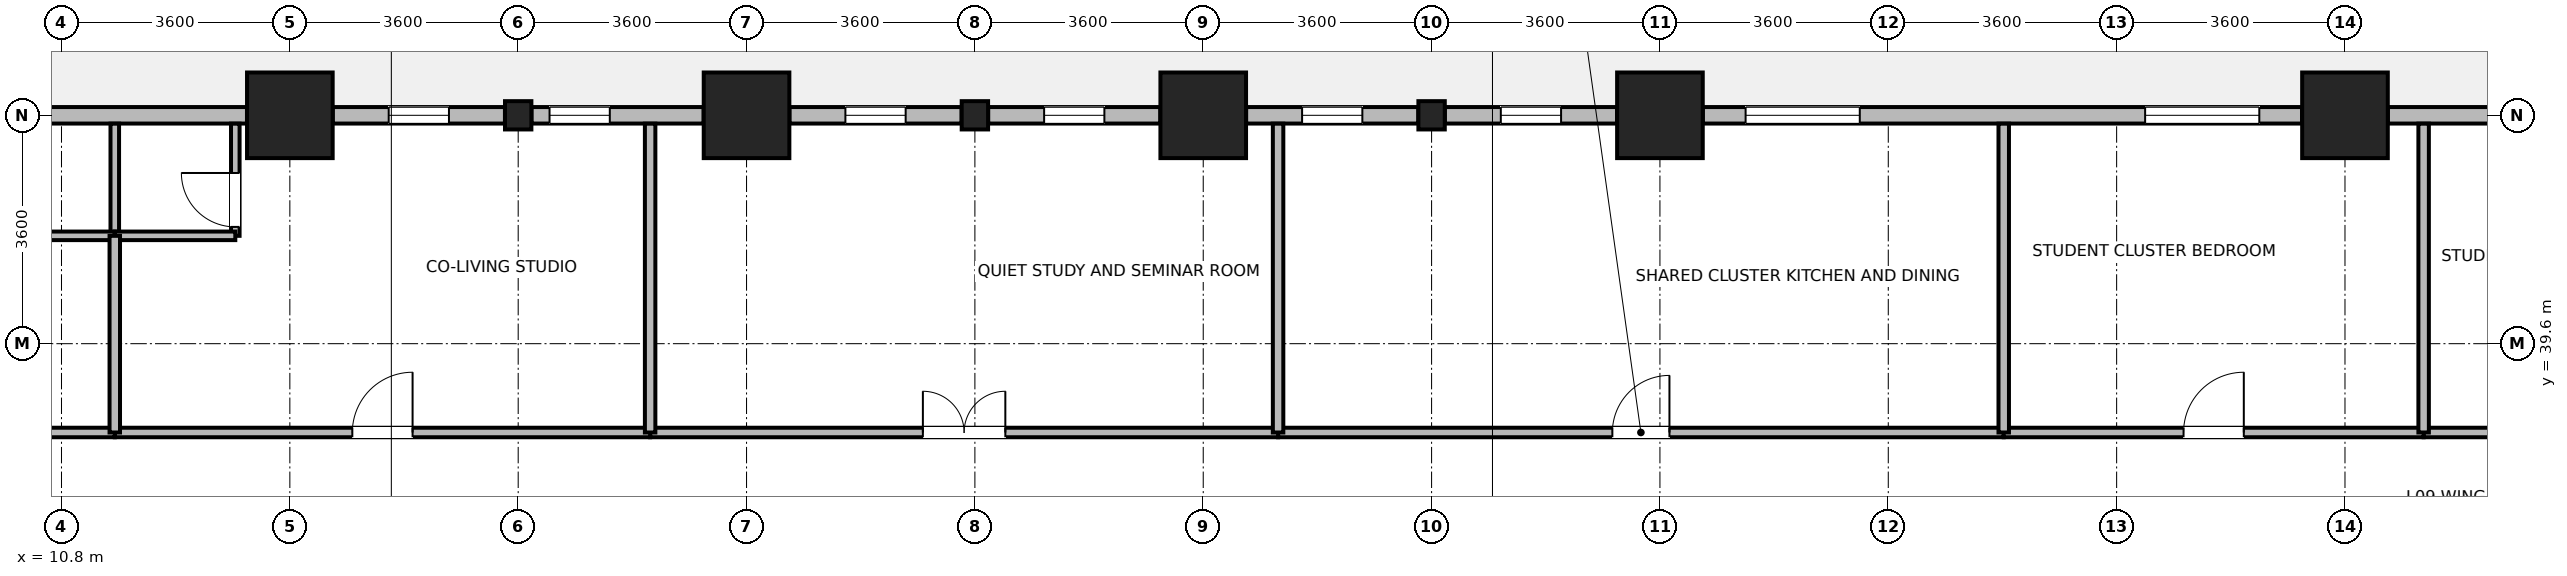
"""IFC4 building model, lengths in metres.
Left out: names, types, materials, properties, quantities, classifications, styles, units other than length and angle.
Written with IfcOpenShell. Run it as: python <this file> out.ifc"""

import sys

from ifc_helpers import new_model, si_unit, direction, frame, frame_2d, origin, origin_2d, place, context, subcontext, project, spatial, rectangle, i_section, extrude, source, transform, mapped, element, fill, save


model = new_model("IFC4")
c1 = context("Model", 3, precision=1e-05, world=origin(), true_north=direction((0.0, 1.0)))
c2 = subcontext(c1, "Body", "Model", "MODEL_VIEW")
j1 = project(units=[si_unit("LENGTHUNIT", "METRE"), si_unit("PLANEANGLEUNIT", "RADIAN")], contexts=[c1])
p1 = place(None, origin())
s1 = spatial("IfcSite", under=j1, at=p1, CompositionType="ELEMENT")
p2 = place(p1, origin())
s2 = spatial("IfcBuilding", under=s1, at=p2, CompositionType="ELEMENT")
p3 = place(p2, frame((0.0, 0.0, 40.1)))
s3 = spatial("IfcBuildingStorey", under=s2, at=p3, CompositionType="ELEMENT", Elevation=40.1)
m1 = source(origin(), c2, "Body", "SweptSolid", [
    extrude(rectangle(XDim=1.35, YDim=1.35, at=origin_2d()), origin(), (0.0, 0.0, 1.0), 3.7),
])
for number, where, z_axis, x_axis in (
    (1, (14.4, 43.2, 0.0), (0.0, 0.0, 1.0), (1.0, 0.0, 0.0)),
    (2, (21.6, 43.2, 0.0), (0.0, 0.0, 1.0), (1.0, 0.0, 0.0)),
    (3, (28.8, 43.2, 0.0), (0.0, 0.0, 1.0), (1.0, 0.0, 0.0)),
    (4, (36.0, 43.2, 0.0), (0.0, 0.0, 1.0), (1.0, 0.0, 0.0)),
    (5, (46.8, 43.2, 0.0), (0.0, 0.0, 1.0), (1.0, 0.0, 0.0)),
):
    element("IfcColumn", number, at=place(p3, frame(where, z_axis=z_axis, x_axis=x_axis)), inside=s3, PredefinedType="COLUMN", context=c2, shape_type="MappedRepresentation", body=[
        mapped(m1, transform((0.0, 0.0, 0.0), x_axis=(1.0, 0.0, 0.0), y_axis=(0.0, 1.0, 0.0), z_axis=(0.0, 0.0, 1.0), scale=1.0)),
    ])
m2 = source(origin(), c2, "Body", "SweptSolid", [
    extrude(i_section(OverallWidth=0.416, OverallDepth=0.446, WebThickness=0.029, FlangeThickness=0.04, FilletRadius=0.015, at=origin_2d()), origin(), (0.0, 0.0, 1.0), 3.7),
])
for number, where, z_axis, x_axis in (
    (6, (18.0, 43.2, 0.0), (0.0, 0.0, 1.0), (1.0, 0.0, 0.0)),
    (7, (25.2, 43.2, 0.0), (0.0, 0.0, 1.0), (1.0, 0.0, 0.0)),
    (8, (32.4, 43.2, 0.0), (0.0, 0.0, 1.0), (1.0, 0.0, 0.0)),
):
    element("IfcColumn", number, at=place(p3, frame(where, z_axis=z_axis, x_axis=x_axis)), inside=s3, PredefinedType="COLUMN", context=c2, shape_type="MappedRepresentation", body=[
        mapped(m2, transform((0.0, 0.0, 0.0), x_axis=(1.0, 0.0, 0.0), y_axis=(0.0, 1.0, 0.0), z_axis=(0.0, 0.0, 1.0), scale=1.0)),
    ])
p4 = place(p3, frame((47.476, 43.2, 0.0), z_axis=(0.0, 0.0, 1.0), x_axis=(1.0, 0.0, 0.0)))
e9 = element("IfcWall", 9, at=p4, inside=s3, PredefinedType="STANDARD", context=c2, shape_type="SweptSolid", body=[
    extrude(rectangle(XDim=9.989, YDim=0.26, at=frame_2d((4.995, 0.0))), origin(), (0.0, 0.0, 1.0), 3.43),
])
p5 = place(p4, frame((4.245, 0.0, 0.0)))
e10 = element("IfcOpeningElement", 10, at=p5, cuts=e9, PredefinedType="OPENING", context=c2, shape_type="SweptSolid", body=[
    extrude(rectangle(XDim=1.5, YDim=2.15, at=frame_2d((0.75, 1.075))), frame((0.0, 0.14, 0.0), z_axis=(0.0, -1.0, 0.0), x_axis=(1.0, 0.0, 0.0)), (0.0, 0.0, 1.0), 0.28),
])
p6 = place(p3, frame((36.676, 43.2, 0.0), z_axis=(0.0, 0.0, 1.0), x_axis=(1.0, 0.0, 0.0)))
e11 = element("IfcWall", 11, at=p6, inside=s3, PredefinedType="STANDARD", context=c2, shape_type="SweptSolid", body=[
    extrude(rectangle(XDim=9.448, YDim=0.26, at=frame_2d((4.724, 0.0))), origin(), (0.0, 0.0, 1.0), 2.93),
])
p7 = place(p6, frame((0.675, 0.0, 0.85)))
e12 = element("IfcOpeningElement", 12, at=p7, cuts=e11, PredefinedType="OPENING", context=c2, shape_type="SweptSolid", body=[
    extrude(rectangle(XDim=1.8, YDim=1.85, at=frame_2d((0.9, 0.925))), frame((0.0, 0.14, 0.0), z_axis=(0.0, -1.0, 0.0), x_axis=(1.0, 0.0, 0.0)), (0.0, 0.0, 1.0), 0.28),
])
p8 = place(p6, frame((6.973, 0.0, 0.85)))
e13 = element("IfcOpeningElement", 13, at=p8, cuts=e11, PredefinedType="OPENING", context=c2, shape_type="SweptSolid", body=[
    extrude(rectangle(XDim=1.8, YDim=1.85, at=frame_2d((0.9, 0.925))), frame((0.0, 0.14, 0.0), z_axis=(0.0, -1.0, 0.0), x_axis=(1.0, 0.0, 0.0)), (0.0, 0.0, 1.0), 0.28),
])
p9 = place(p3, frame((32.609, 43.2, 0.0), z_axis=(0.0, 0.0, 1.0), x_axis=(1.0, 0.0, 0.0)))
e14 = element("IfcWall", 14, at=p9, inside=s3, PredefinedType="STANDARD", context=c2, shape_type="SweptSolid", body=[
    extrude(rectangle(XDim=2.715, YDim=0.26, at=frame_2d((1.357, 0.0))), origin(), (0.0, 0.0, 1.0), 2.93),
])
p10 = place(p9, frame((0.883, 0.0, 0.85)))
e15 = element("IfcOpeningElement", 15, at=p10, cuts=e14, PredefinedType="OPENING", context=c2, shape_type="SweptSolid", body=[
    extrude(rectangle(XDim=0.95, YDim=1.75, at=frame_2d((0.475, 0.875))), frame((0.0, 0.14, 0.0), z_axis=(0.0, -1.0, 0.0), x_axis=(1.0, 0.0, 0.0)), (0.0, 0.0, 1.0), 0.28),
])
p11 = place(p3, frame((29.476, 43.2, 0.0), z_axis=(0.0, 0.0, 1.0), x_axis=(1.0, 0.0, 0.0)))
e16 = element("IfcWall", 16, at=p11, inside=s3, PredefinedType="STANDARD", context=c2, shape_type="SweptSolid", body=[
    extrude(rectangle(XDim=2.715, YDim=0.26, at=frame_2d((1.357, 0.0))), origin(), (0.0, 0.0, 1.0), 2.93),
])
p12 = place(p11, frame((0.883, 0.0, 0.85)))
e17 = element("IfcOpeningElement", 17, at=p12, cuts=e16, PredefinedType="OPENING", context=c2, shape_type="SweptSolid", body=[
    extrude(rectangle(XDim=0.95, YDim=1.75, at=frame_2d((0.475, 0.875))), frame((0.0, 0.14, 0.0), z_axis=(0.0, -1.0, 0.0), x_axis=(1.0, 0.0, 0.0)), (0.0, 0.0, 1.0), 0.28),
])
p13 = place(p3, frame((25.409, 43.2, 0.0), z_axis=(0.0, 0.0, 1.0), x_axis=(1.0, 0.0, 0.0)))
e18 = element("IfcWall", 18, at=p13, inside=s3, PredefinedType="STANDARD", context=c2, shape_type="SweptSolid", body=[
    extrude(rectangle(XDim=2.715, YDim=0.26, at=frame_2d((1.357, 0.0))), origin(), (0.0, 0.0, 1.0), 2.93),
])
p14 = place(p13, frame((0.883, 0.0, 0.85)))
e19 = element("IfcOpeningElement", 19, at=p14, cuts=e18, PredefinedType="OPENING", context=c2, shape_type="SweptSolid", body=[
    extrude(rectangle(XDim=0.95, YDim=1.75, at=frame_2d((0.475, 0.875))), frame((0.0, 0.14, 0.0), z_axis=(0.0, -1.0, 0.0), x_axis=(1.0, 0.0, 0.0)), (0.0, 0.0, 1.0), 0.28),
])
p15 = place(p3, frame((22.276, 43.2, 0.0), z_axis=(0.0, 0.0, 1.0), x_axis=(1.0, 0.0, 0.0)))
e20 = element("IfcWall", 20, at=p15, inside=s3, PredefinedType="STANDARD", context=c2, shape_type="SweptSolid", body=[
    extrude(rectangle(XDim=2.715, YDim=0.26, at=frame_2d((1.357, 0.0))), origin(), (0.0, 0.0, 1.0), 2.93),
])
p16 = place(p15, frame((0.883, 0.0, 0.85)))
e21 = element("IfcOpeningElement", 21, at=p16, cuts=e20, PredefinedType="OPENING", context=c2, shape_type="SweptSolid", body=[
    extrude(rectangle(XDim=0.95, YDim=1.75, at=frame_2d((0.475, 0.875))), frame((0.0, 0.14, 0.0), z_axis=(0.0, -1.0, 0.0), x_axis=(1.0, 0.0, 0.0)), (0.0, 0.0, 1.0), 0.28),
])
p17 = place(p3, frame((18.209, 43.2, 0.0), z_axis=(0.0, 0.0, 1.0), x_axis=(1.0, 0.0, 0.0)))
e22 = element("IfcWall", 22, at=p17, inside=s3, PredefinedType="STANDARD", context=c2, shape_type="SweptSolid", body=[
    extrude(rectangle(XDim=2.715, YDim=0.26, at=frame_2d((1.357, 0.0))), origin(), (0.0, 0.0, 1.0), 2.93),
])
p18 = place(p17, frame((0.285, 0.0, 0.85)))
e23 = element("IfcOpeningElement", 23, at=p18, cuts=e22, PredefinedType="OPENING", context=c2, shape_type="SweptSolid", body=[
    extrude(rectangle(XDim=0.95, YDim=1.75, at=frame_2d((0.475, 0.875))), frame((0.0, 0.14, 0.0), z_axis=(0.0, -1.0, 0.0), x_axis=(1.0, 0.0, 0.0)), (0.0, 0.0, 1.0), 0.28),
])
p19 = place(p3, frame((15.076, 43.2, 0.0), z_axis=(0.0, 0.0, 1.0), x_axis=(1.0, 0.0, 0.0)))
e24 = element("IfcWall", 24, at=p19, inside=s3, PredefinedType="STANDARD", context=c2, shape_type="SweptSolid", body=[
    extrude(rectangle(XDim=2.715, YDim=0.26, at=frame_2d((1.357, 0.0))), origin(), (0.0, 0.0, 1.0), 2.93),
])
p20 = place(p19, frame((0.883, 0.0, 0.85)))
e25 = element("IfcOpeningElement", 25, at=p20, cuts=e24, PredefinedType="OPENING", context=c2, shape_type="SweptSolid", body=[
    extrude(rectangle(XDim=0.95, YDim=1.75, at=frame_2d((0.475, 0.875))), frame((0.0, 0.14, 0.0), z_axis=(0.0, -1.0, 0.0), x_axis=(1.0, 0.0, 0.0)), (0.0, 0.0, 1.0), 0.28),
])
p21 = place(p3, frame((3.735, 43.2, 0.0), z_axis=(0.0, 0.0, 1.0), x_axis=(1.0, 0.0, 0.0)))
e26 = element("IfcWall", 26, at=p21, inside=s3, PredefinedType="STANDARD", context=c2, shape_type="SweptSolid", body=[
    extrude(rectangle(XDim=9.989, YDim=0.26, at=frame_2d((4.995, 0.0))), origin(), (0.0, 0.0, 1.0), 3.43),
])
p22 = place(p21, frame((0.765, 0.0, 0.85)))
e27 = element("IfcOpeningElement", 27, at=p22, cuts=e26, PredefinedType="OPENING", context=c2, shape_type="SweptSolid", body=[
    extrude(rectangle(XDim=1.8, YDim=1.85, at=frame_2d((0.9, 0.925))), frame((0.0, 0.14, 0.0), z_axis=(0.0, -1.0, 0.0), x_axis=(1.0, 0.0, 0.0)), (0.0, 0.0, 1.0), 0.28),
])
p23 = place(p21, frame((4.52, 0.0, 0.85)))
e28 = element("IfcOpeningElement", 28, at=p23, cuts=e26, PredefinedType="OPENING", context=c2, shape_type="SweptSolid", body=[
    extrude(rectangle(XDim=0.95, YDim=1.75, at=frame_2d((0.475, 0.875))), frame((0.0, 0.14, 0.0), z_axis=(0.0, -1.0, 0.0), x_axis=(1.0, 0.0, 0.0)), (0.0, 0.0, 1.0), 0.28),
])
p24 = place(p3, frame((11.64, 41.3, 0.0), z_axis=(0.0, 0.0, 1.0), x_axis=(0.0, 1.0, 0.0)))
e29 = element("IfcWall", 29, at=p24, inside=s3, PredefinedType="PARTITIONING", context=c2, shape_type="SweptSolid", body=[
    extrude(rectangle(XDim=1.768, YDim=0.135, at=frame_2d((0.884, 0.0))), origin(), (0.0, 0.0, 1.0), 3.43),
])
p25 = place(p3, frame((13.54, 41.3, 0.0), z_axis=(0.0, 0.0, 1.0), x_axis=(0.0, 1.0, 0.0)))
e30 = element("IfcWall", 30, at=p25, inside=s3, PredefinedType="PARTITIONING", context=c2, shape_type="SweptSolid", body=[
    extrude(rectangle(XDim=1.768, YDim=0.135, at=frame_2d((0.884, 0.0))), origin(), (0.0, 0.0, 1.0), 3.43),
])
p26 = place(p25, frame((0.141, 0.0, 0.0)))
e31 = element("IfcOpeningElement", 31, at=p26, cuts=e30, PredefinedType="OPENING", context=c2, shape_type="SweptSolid", body=[
    extrude(rectangle(XDim=0.85, YDim=2.04, at=frame_2d((0.425, 1.02))), frame((0.0, 0.078, 0.0), z_axis=(0.0, -1.0, 0.0), x_axis=(1.0, 0.0, 0.0)), (0.0, 0.0, 1.0), 0.155),
])
p27 = place(p3, frame((9.74, 41.3, 0.0), z_axis=(0.0, 0.0, 1.0), x_axis=(1.0, 0.0, 0.0)))
e32 = element("IfcWall", 32, at=p27, inside=s3, PredefinedType="PARTITIONING", context=c2, shape_type="SweptSolid", body=[
    extrude(rectangle(XDim=1.9, YDim=0.135, at=frame_2d((0.95, 0.0))), origin(), (0.0, 0.0, 1.0), 3.43),
])
p28 = place(p3, frame((11.64, 41.3, 0.0), z_axis=(0.0, 0.0, 1.0), x_axis=(1.0, 0.0, 0.0)))
e33 = element("IfcWall", 33, at=p28, inside=s3, PredefinedType="PARTITIONING", context=c2, shape_type="SweptSolid", body=[
    extrude(rectangle(XDim=1.9, YDim=0.135, at=frame_2d((0.95, 0.0))), origin(), (0.0, 0.0, 1.0), 3.43),
])
p29 = place(p3, frame((29.98, 38.2, 0.0), z_axis=(0.0, 0.0, 1.0), x_axis=(1.0, 0.0, 0.0)))
e34 = element("IfcWall", 34, at=p29, inside=s3, PredefinedType="PARTITIONING", context=c2, shape_type="SweptSolid", body=[
    extrude(rectangle(XDim=11.44, YDim=0.15, at=frame_2d((5.72, 0.0))), origin(), (0.0, 0.0, 1.0), 3.43),
])
p30 = place(p29, frame((5.27, 0.0, 0.0)))
e35 = element("IfcOpeningElement", 35, at=p30, cuts=e34, PredefinedType="OPENING", context=c2, shape_type="SweptSolid", body=[
    extrude(rectangle(XDim=0.9, YDim=2.08, at=frame_2d((0.45, 1.04))), frame((0.0, 0.085, 0.0), z_axis=(0.0, -1.0, 0.0), x_axis=(1.0, 0.0, 0.0)), (0.0, 0.0, 1.0), 0.17),
])
p31 = place(p3, frame((20.08, 38.2, 0.0), z_axis=(0.0, 0.0, 1.0), x_axis=(1.0, 0.0, 0.0)))
e36 = element("IfcWall", 36, at=p31, inside=s3, PredefinedType="PARTITIONING", context=c2, shape_type="SweptSolid", body=[
    extrude(rectangle(XDim=9.9, YDim=0.15, at=frame_2d((4.95, 0.0))), origin(), (0.0, 0.0, 1.0), 3.43),
])
p32 = place(p31, frame((4.3, 0.0, 0.0)))
e37 = element("IfcOpeningElement", 37, at=p32, cuts=e36, PredefinedType="OPENING", context=c2, shape_type="SweptSolid", body=[
    extrude(rectangle(XDim=1.3, YDim=2.12, at=frame_2d((0.65, 1.06))), frame((0.0, 0.085, 0.0), z_axis=(0.0, -1.0, 0.0), x_axis=(1.0, 0.0, 0.0)), (0.0, 0.0, 1.0), 0.17),
])
p33 = place(p3, frame((11.64, 38.2, 0.0), z_axis=(0.0, 0.0, 1.0), x_axis=(1.0, 0.0, 0.0)))
e38 = element("IfcWall", 38, at=p33, inside=s3, PredefinedType="PARTITIONING", context=c2, shape_type="SweptSolid", body=[
    extrude(rectangle(XDim=8.44, YDim=0.15, at=frame_2d((4.22, 0.0))), origin(), (0.0, 0.0, 1.0), 3.43),
])
p34 = place(p33, frame((3.745, 0.0, 0.0)))
e39 = element("IfcOpeningElement", 39, at=p34, cuts=e38, PredefinedType="OPENING", context=c2, shape_type="SweptSolid", body=[
    extrude(rectangle(XDim=0.95, YDim=2.1, at=frame_2d((0.475, 1.05))), frame((0.0, 0.085, 0.0), z_axis=(0.0, -1.0, 0.0), x_axis=(1.0, 0.0, 0.0)), (0.0, 0.0, 1.0), 0.17),
])
p35 = place(p3, frame((3.732, 38.2, 0.0), z_axis=(0.0, 0.0, 1.0), x_axis=(1.0, 0.0, 0.0)))
e40 = element("IfcWall", 40, at=p35, inside=s3, PredefinedType="PARTITIONING", context=c2, shape_type="SweptSolid", body=[
    extrude(rectangle(XDim=7.908, YDim=0.15, at=frame_2d((3.954, 0.0))), origin(), (0.0, 0.0, 1.0), 3.43),
])
p36 = place(p35, frame((3.479, 0.0, 0.0)))
e41 = element("IfcOpeningElement", 41, at=p36, cuts=e40, PredefinedType="OPENING", context=c2, shape_type="SweptSolid", body=[
    extrude(rectangle(XDim=0.95, YDim=2.1, at=frame_2d((0.475, 1.05))), frame((0.0, 0.085, 0.0), z_axis=(0.0, -1.0, 0.0), x_axis=(1.0, 0.0, 0.0)), (0.0, 0.0, 1.0), 0.17),
])
p37 = place(p3, frame((48.04, 38.2, 0.0), z_axis=(0.0, 0.0, 1.0), x_axis=(1.0, 0.0, 0.0)))
e42 = element("IfcWall", 42, at=p37, inside=s3, PredefinedType="PARTITIONING", context=c2, shape_type="SweptSolid", body=[
    extrude(rectangle(XDim=7.0, YDim=0.15, at=frame_2d((3.5, 0.0))), origin(), (0.0, 0.0, 1.0), 3.43),
])
p38 = place(p37, frame((3.025, 0.0, 0.0)))
e43 = element("IfcOpeningElement", 43, at=p38, cuts=e42, PredefinedType="OPENING", context=c2, shape_type="SweptSolid", body=[
    extrude(rectangle(XDim=0.95, YDim=2.1, at=frame_2d((0.475, 1.05))), frame((0.0, 0.085, 0.0), z_axis=(0.0, -1.0, 0.0), x_axis=(1.0, 0.0, 0.0)), (0.0, 0.0, 1.0), 0.17),
])
p39 = place(p3, frame((41.42, 38.2, 0.0), z_axis=(0.0, 0.0, 1.0), x_axis=(1.0, 0.0, 0.0)))
e44 = element("IfcWall", 44, at=p39, inside=s3, PredefinedType="PARTITIONING", context=c2, shape_type="SweptSolid", body=[
    extrude(rectangle(XDim=6.62, YDim=0.15, at=frame_2d((3.31, 0.0))), origin(), (0.0, 0.0, 1.0), 3.43),
])
p40 = place(p39, frame((2.835, 0.0, 0.0)))
e45 = element("IfcOpeningElement", 45, at=p40, cuts=e44, PredefinedType="OPENING", context=c2, shape_type="SweptSolid", body=[
    extrude(rectangle(XDim=0.95, YDim=2.1, at=frame_2d((0.475, 1.05))), frame((0.0, 0.085, 0.0), z_axis=(0.0, -1.0, 0.0), x_axis=(1.0, 0.0, 0.0)), (0.0, 0.0, 1.0), 0.17),
])
for number, where, z_axis, x_axis in (
    (46, (20.08, 38.2, 0.0), (0.0, 0.0, 1.0), (0.0, 1.0, 0.0)),
    (47, (29.98, 38.2, 0.0), (0.0, 0.0, 1.0), (0.0, 1.0, 0.0)),
    (48, (41.42, 38.2, 0.0), (0.0, 0.0, 1.0), (0.0, 1.0, 0.0)),
    (49, (48.04, 38.2, 0.0), (0.0, 0.0, 1.0), (0.0, 1.0, 0.0)),
):
    element("IfcWall", number, at=place(p3, frame(where, z_axis=z_axis, x_axis=x_axis)), inside=s3, PredefinedType="PARTITIONING", context=c2, shape_type="SweptSolid", body=[
        extrude(rectangle(XDim=4.868, YDim=0.165, at=frame_2d((2.434, 0.0))), origin(), (0.0, 0.0, 1.0), 3.43),
    ])
p41 = place(p3, frame((11.64, 38.2, 0.0), z_axis=(0.0, 0.0, 1.0), x_axis=(0.0, 1.0, 0.0)))
e50 = element("IfcWall", 50, at=p41, inside=s3, PredefinedType="PARTITIONING", context=c2, shape_type="SweptSolid", body=[
    extrude(rectangle(XDim=3.1, YDim=0.165, at=frame_2d((1.55, 0.0))), origin(), (0.0, 0.0, 1.0), 3.43),
])
p42 = place(p7, origin())
e51 = element("IfcWindow", 51, at=p42, inside=s3, PartitioningType="SINGLE_PANEL", PredefinedType="WINDOW", context=c2, shape_type="SweptSolid", body=[
    extrude(rectangle(XDim=1.8, YDim=1.85, at=frame_2d((0.9, 0.925))), frame((0.0, 0.03, 0.0), z_axis=(0.0, -1.0, 0.0), x_axis=(1.0, 0.0, 0.0)), (0.0, 0.0, 1.0), 0.06),
])
fill(e12, e51)
p43 = place(p8, origin())
e52 = element("IfcWindow", 52, at=p43, inside=s3, PartitioningType="SINGLE_PANEL", PredefinedType="WINDOW", context=c2, shape_type="SweptSolid", body=[
    extrude(rectangle(XDim=1.8, YDim=1.85, at=frame_2d((0.9, 0.925))), frame((0.0, 0.03, 0.0), z_axis=(0.0, -1.0, 0.0), x_axis=(1.0, 0.0, 0.0)), (0.0, 0.0, 1.0), 0.06),
])
fill(e13, e52)
p44 = place(p10, origin())
e53 = element("IfcWindow", 53, at=p44, inside=s3, PartitioningType="SINGLE_PANEL", PredefinedType="WINDOW", context=c2, shape_type="SweptSolid", body=[
    extrude(rectangle(XDim=0.95, YDim=1.75, at=frame_2d((0.475, 0.875))), frame((0.0, 0.03, 0.0), z_axis=(0.0, -1.0, 0.0), x_axis=(1.0, 0.0, 0.0)), (0.0, 0.0, 1.0), 0.06),
])
fill(e15, e53)
p45 = place(p12, origin())
e54 = element("IfcWindow", 54, at=p45, inside=s3, PartitioningType="SINGLE_PANEL", PredefinedType="WINDOW", context=c2, shape_type="SweptSolid", body=[
    extrude(rectangle(XDim=0.95, YDim=1.75, at=frame_2d((0.475, 0.875))), frame((0.0, 0.03, 0.0), z_axis=(0.0, -1.0, 0.0), x_axis=(1.0, 0.0, 0.0)), (0.0, 0.0, 1.0), 0.06),
])
fill(e17, e54)
p46 = place(p14, origin())
e55 = element("IfcWindow", 55, at=p46, inside=s3, PartitioningType="SINGLE_PANEL", PredefinedType="WINDOW", context=c2, shape_type="SweptSolid", body=[
    extrude(rectangle(XDim=0.95, YDim=1.75, at=frame_2d((0.475, 0.875))), frame((0.0, 0.03, 0.0), z_axis=(0.0, -1.0, 0.0), x_axis=(1.0, 0.0, 0.0)), (0.0, 0.0, 1.0), 0.06),
])
fill(e19, e55)
p47 = place(p16, origin())
e56 = element("IfcWindow", 56, at=p47, inside=s3, PartitioningType="SINGLE_PANEL", PredefinedType="WINDOW", context=c2, shape_type="SweptSolid", body=[
    extrude(rectangle(XDim=0.95, YDim=1.75, at=frame_2d((0.475, 0.875))), frame((0.0, 0.03, 0.0), z_axis=(0.0, -1.0, 0.0), x_axis=(1.0, 0.0, 0.0)), (0.0, 0.0, 1.0), 0.06),
])
fill(e21, e56)
p48 = place(p18, origin())
e57 = element("IfcWindow", 57, at=p48, inside=s3, PartitioningType="SINGLE_PANEL", PredefinedType="WINDOW", context=c2, shape_type="SweptSolid", body=[
    extrude(rectangle(XDim=0.95, YDim=1.75, at=frame_2d((0.475, 0.875))), frame((0.0, 0.03, 0.0), z_axis=(0.0, -1.0, 0.0), x_axis=(1.0, 0.0, 0.0)), (0.0, 0.0, 1.0), 0.06),
])
fill(e23, e57)
p49 = place(p20, origin())
e58 = element("IfcWindow", 58, at=p49, inside=s3, PartitioningType="SINGLE_PANEL", PredefinedType="WINDOW", context=c2, shape_type="SweptSolid", body=[
    extrude(rectangle(XDim=0.95, YDim=1.75, at=frame_2d((0.475, 0.875))), frame((0.0, 0.03, 0.0), z_axis=(0.0, -1.0, 0.0), x_axis=(1.0, 0.0, 0.0)), (0.0, 0.0, 1.0), 0.06),
])
fill(e25, e58)
p50 = place(p26, origin())
e59 = element("IfcDoor", 59, at=p50, inside=s3, OperationType="SINGLE_SWING_RIGHT", PredefinedType="DOOR", context=c2, shape_type="SweptSolid", body=[
    extrude(rectangle(XDim=0.85, YDim=2.04, at=frame_2d((0.425, 1.02))), frame((0.0, 0.025, 0.0), z_axis=(0.0, -1.0, 0.0), x_axis=(1.0, 0.0, 0.0)), (0.0, 0.0, 1.0), 0.05),
])
fill(e31, e59)
p51 = place(p30, origin())
e60 = element("IfcDoor", 60, at=p51, inside=s3, OperationType="SINGLE_SWING_RIGHT", PredefinedType="DOOR", context=c2, shape_type="SweptSolid", body=[
    extrude(rectangle(XDim=0.9, YDim=2.08, at=frame_2d((0.45, 1.04))), frame((0.0, 0.025, 0.0), z_axis=(0.0, -1.0, 0.0), x_axis=(1.0, 0.0, 0.0)), (0.0, 0.0, 1.0), 0.05),
])
fill(e35, e60)
p52 = place(p32, origin())
e61 = element("IfcDoor", 61, at=p52, inside=s3, OperationType="DOUBLE_DOOR_SINGLE_SWING", PredefinedType="DOOR", context=c2, shape_type="SweptSolid", body=[
    extrude(rectangle(XDim=1.3, YDim=2.12, at=frame_2d((0.65, 1.06))), frame((0.0, 0.025, 0.0), z_axis=(0.0, -1.0, 0.0), x_axis=(1.0, 0.0, 0.0)), (0.0, 0.0, 1.0), 0.05),
])
fill(e37, e61)
p53 = place(p34, origin())
e62 = element("IfcDoor", 62, at=p53, inside=s3, OperationType="SINGLE_SWING_RIGHT", PredefinedType="DOOR", context=c2, shape_type="SweptSolid", body=[
    extrude(rectangle(XDim=0.95, YDim=2.1, at=frame_2d((0.475, 1.05))), frame((0.0, 0.025, 0.0), z_axis=(0.0, -1.0, 0.0), x_axis=(1.0, 0.0, 0.0)), (0.0, 0.0, 1.0), 0.05),
])
fill(e39, e62)
p54 = place(p40, origin())
e63 = element("IfcDoor", 63, at=p54, inside=s3, OperationType="SINGLE_SWING_RIGHT", PredefinedType="DOOR", context=c2, shape_type="SweptSolid", body=[
    extrude(rectangle(XDim=0.95, YDim=2.1, at=frame_2d((0.475, 1.05))), frame((0.0, 0.025, 0.0), z_axis=(0.0, -1.0, 0.0), x_axis=(1.0, 0.0, 0.0)), (0.0, 0.0, 1.0), 0.05),
])
fill(e45, e63)
save(model, sys.argv[1])
